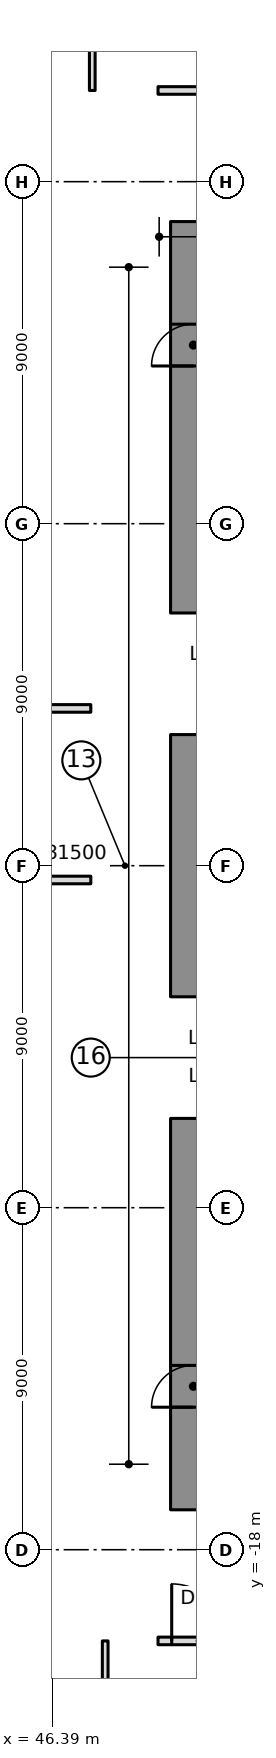
"""IFC4 building model, lengths in metres.
Left out: names, types, materials, properties, quantities, classifications, styles, units other than length and angle.
Written with IfcOpenShell. Run it as: python <this file> out.ifc"""

import sys

from ifc_helpers import new_model, si_unit, direction, frame, frame_2d, origin, place, context, subcontext, project, spatial, rectangle, extrude, element, fill, save


model = new_model("IFC4")
c1 = context("Model", 3, precision=1e-05, world=origin(), true_north=direction((0.0, 1.0)))
c2 = subcontext(c1, "Body", "Model", "MODEL_VIEW")
j1 = project(units=[si_unit("LENGTHUNIT", "METRE"), si_unit("PLANEANGLEUNIT", "RADIAN")], contexts=[c1])
p1 = place(None, origin())
s1 = spatial("IfcSite", under=j1, at=p1, CompositionType="ELEMENT")
p2 = place(p1, origin())
s2 = spatial("IfcBuilding", under=s1, at=p2, CompositionType="ELEMENT")
p3 = place(p2, frame((0.0, 0.0, 24.0)))
s3 = spatial("IfcBuildingStorey", under=s2, at=p3, CompositionType="ELEMENT", Elevation=24.0)
p4 = place(p3, frame((50.1, 6.65, 0.0), z_axis=(0.0, 0.0, 1.0), x_axis=(0.0, 1.0, 0.0)))
e1 = element("IfcWall", 1, at=p4, inside=s3, PredefinedType="SHEAR", context=c2, shape_type="SweptSolid", body=[
    extrude(rectangle(XDim=10.3, YDim=1.2, at=frame_2d((5.15, 0.0))), origin(), (0.0, 0.0, 1.0), 5.0),
])
p5 = place(p4, frame((6.5, 0.0, 0.0)))
e2 = element("IfcOpeningElement", 2, at=p5, cuts=e1, PredefinedType="OPENING", context=c2, shape_type="SweptSolid", body=[
    extrude(rectangle(XDim=1.1, YDim=2.1, at=frame_2d((0.55, 1.05))), frame((0.0, 0.61, 0.0), z_axis=(0.0, -1.0, 0.0), x_axis=(1.0, 0.0, 0.0)), (0.0, 0.0, 1.0), 1.22),
])
p6 = place(p3, frame((50.1, -3.45, 0.0), z_axis=(0.0, 0.0, 1.0), x_axis=(0.0, 1.0, 0.0)))
e3 = element("IfcWall", 3, at=p6, inside=s3, PredefinedType="SHEAR", context=c2, shape_type="SweptSolid", body=[
    extrude(rectangle(XDim=6.9, YDim=1.2, at=frame_2d((3.45, 0.0))), origin(), (0.0, 0.0, 1.0), 5.0),
])
p7 = place(p3, frame((50.1, -16.95, 0.0), z_axis=(0.0, 0.0, 1.0), x_axis=(0.0, 1.0, 0.0)))
e4 = element("IfcWall", 4, at=p7, inside=s3, PredefinedType="SHEAR", context=c2, shape_type="SweptSolid", body=[
    extrude(rectangle(XDim=10.3, YDim=1.2, at=frame_2d((5.15, 0.0))), origin(), (0.0, 0.0, 1.0), 5.0),
])
p8 = place(p7, frame((2.7, 0.0, 0.0)))
e5 = element("IfcOpeningElement", 5, at=p8, cuts=e4, PredefinedType="OPENING", context=c2, shape_type="SweptSolid", body=[
    extrude(rectangle(XDim=1.1, YDim=2.1, at=frame_2d((0.55, 1.05))), frame((0.0, 0.61, 0.0), z_axis=(0.0, -1.0, 0.0), x_axis=(1.0, 0.0, 0.0)), (0.0, 0.0, 1.0), 1.22),
])
p9 = place(p3, frame((43.43, -0.376, 0.0), z_axis=(0.0, 0.0, 1.0), x_axis=(1.0, 0.0, 0.0)))
e6 = element("IfcWall", 6, at=p9, inside=s3, PredefinedType="PARTITIONING", context=c2, shape_type="SweptSolid", body=[
    extrude(rectangle(XDim=3.971, YDim=0.2, at=frame_2d((1.985, 0.0))), origin(), (0.0, 0.0, 1.0), 4.55),
])
p10 = place(p3, frame((47.78, -36.6, 0.0), z_axis=(0.0, 0.0, 1.0), x_axis=(0.0, 1.0, 0.0)))
e7 = element("IfcWall", 7, at=p10, inside=s3, PredefinedType="PARTITIONING", context=c2, shape_type="SweptSolid", body=[
    extrude(rectangle(XDim=16.2, YDim=0.15, at=frame_2d((8.1, 0.0))), origin(), (0.0, 0.0, 1.0), 4.55),
])
p11 = place(p3, frame((43.43, 4.139, 0.0), z_axis=(0.0, 0.0, 1.0), x_axis=(1.0, 0.0, 0.0)))
e8 = element("IfcWall", 8, at=p11, inside=s3, PredefinedType="PARTITIONING", context=c2, shape_type="SweptSolid", body=[
    extrude(rectangle(XDim=3.971, YDim=0.2, at=frame_2d((1.985, 0.0))), origin(), (0.0, 0.0, 1.0), 4.55),
])
p12 = place(p11, frame((0.771, 0.0, 0.0)))
e9 = element("IfcOpeningElement", 9, at=p12, cuts=e8, PredefinedType="OPENING", context=c2, shape_type="SweptSolid", body=[
    extrude(rectangle(XDim=1.5, YDim=2.1, at=frame_2d((0.75, 1.05))), frame((0.0, 0.11, 0.0), z_axis=(0.0, -1.0, 0.0), x_axis=(1.0, 0.0, 0.0)), (0.0, 0.0, 1.0), 0.22),
])
p13 = place(p3, frame((47.44, 20.4, 0.0), z_axis=(0.0, 0.0, 1.0), x_axis=(0.0, 1.0, 0.0)))
e10 = element("IfcWall", 10, at=p13, inside=s3, PredefinedType="PARTITIONING", context=c2, shape_type="SweptSolid", body=[
    extrude(rectangle(XDim=16.2, YDim=0.15, at=frame_2d((8.1, 0.0))), origin(), (0.0, 0.0, 1.0), 4.55),
])
p14 = place(p3, frame((49.17, -20.4, 0.0), z_axis=(0.0, 0.0, 1.0), x_axis=(1.0, 0.0, 0.0)))
e11 = element("IfcWall", 11, at=p14, inside=s3, PredefinedType="PARTITIONING", context=c2, shape_type="SweptSolid", body=[
    extrude(rectangle(XDim=2.01, YDim=0.2, at=frame_2d((1.005, 0.0))), origin(), (0.0, 0.0, 1.0), 4.55),
])
p15 = place(p14, frame((0.36, 0.0, 0.0)))
e12 = element("IfcOpeningElement", 12, at=p15, cuts=e11, PredefinedType="OPENING", context=c2, shape_type="SweptSolid", body=[
    extrude(rectangle(XDim=1.5, YDim=2.1, at=frame_2d((0.75, 1.05))), frame((0.0, 0.11, 0.0), z_axis=(0.0, -1.0, 0.0), x_axis=(1.0, 0.0, 0.0)), (0.0, 0.0, 1.0), 0.22),
])
p16 = place(p3, frame((54.252, 20.4, 0.0), z_axis=(0.0, 0.0, 1.0), x_axis=(-1.0, 0.0, 0.0)))
e13 = element("IfcWall", 13, at=p16, inside=s3, PredefinedType="PARTITIONING", context=c2, shape_type="SweptSolid", body=[
    extrude(rectangle(XDim=5.082, YDim=0.2, at=frame_2d((2.541, 0.0))), origin(), (0.0, 0.0, 1.0), 4.55),
])
p17 = place(p16, frame((2.041, 0.0, 0.0)))
e14 = element("IfcOpeningElement", 14, at=p17, cuts=e13, PredefinedType="OPENING", context=c2, shape_type="SweptSolid", body=[
    extrude(rectangle(XDim=1.2, YDim=2.1, at=frame_2d((0.6, 1.05))), frame((0.0, 0.11, 0.0), z_axis=(0.0, -1.0, 0.0), x_axis=(1.0, 0.0, 0.0)), (0.0, 0.0, 1.0), 0.22),
])
p18 = place(p15, origin())
e15 = element("IfcDoor", 15, at=p18, inside=s3, OperationType="DOUBLE_DOOR_SINGLE_SWING", PredefinedType="DOOR", context=c2, shape_type="SweptSolid", body=[
    extrude(rectangle(XDim=1.5, YDim=2.1, at=frame_2d((0.75, 1.05))), frame((0.0, 0.025, 0.0), z_axis=(0.0, -1.0, 0.0), x_axis=(1.0, 0.0, 0.0)), (0.0, 0.0, 1.0), 0.05),
])
fill(e12, e15)
p19 = place(p5, origin())
e16 = element("IfcDoor", 16, at=p19, inside=s3, OperationType="SINGLE_SWING_RIGHT", PredefinedType="DOOR", context=c2, shape_type="SweptSolid", body=[
    extrude(rectangle(XDim=1.1, YDim=2.1, at=frame_2d((0.55, 1.05))), frame((0.0, 0.025, 0.0), z_axis=(0.0, -1.0, 0.0), x_axis=(1.0, 0.0, 0.0)), (0.0, 0.0, 1.0), 0.05),
])
fill(e2, e16)
p20 = place(p8, origin())
e17 = element("IfcDoor", 17, at=p20, inside=s3, OperationType="SINGLE_SWING_RIGHT", PredefinedType="DOOR", context=c2, shape_type="SweptSolid", body=[
    extrude(rectangle(XDim=1.1, YDim=2.1, at=frame_2d((0.55, 1.05))), frame((0.0, 0.025, 0.0), z_axis=(0.0, -1.0, 0.0), x_axis=(1.0, 0.0, 0.0)), (0.0, 0.0, 1.0), 0.05),
])
fill(e5, e17)
save(model, sys.argv[1])
